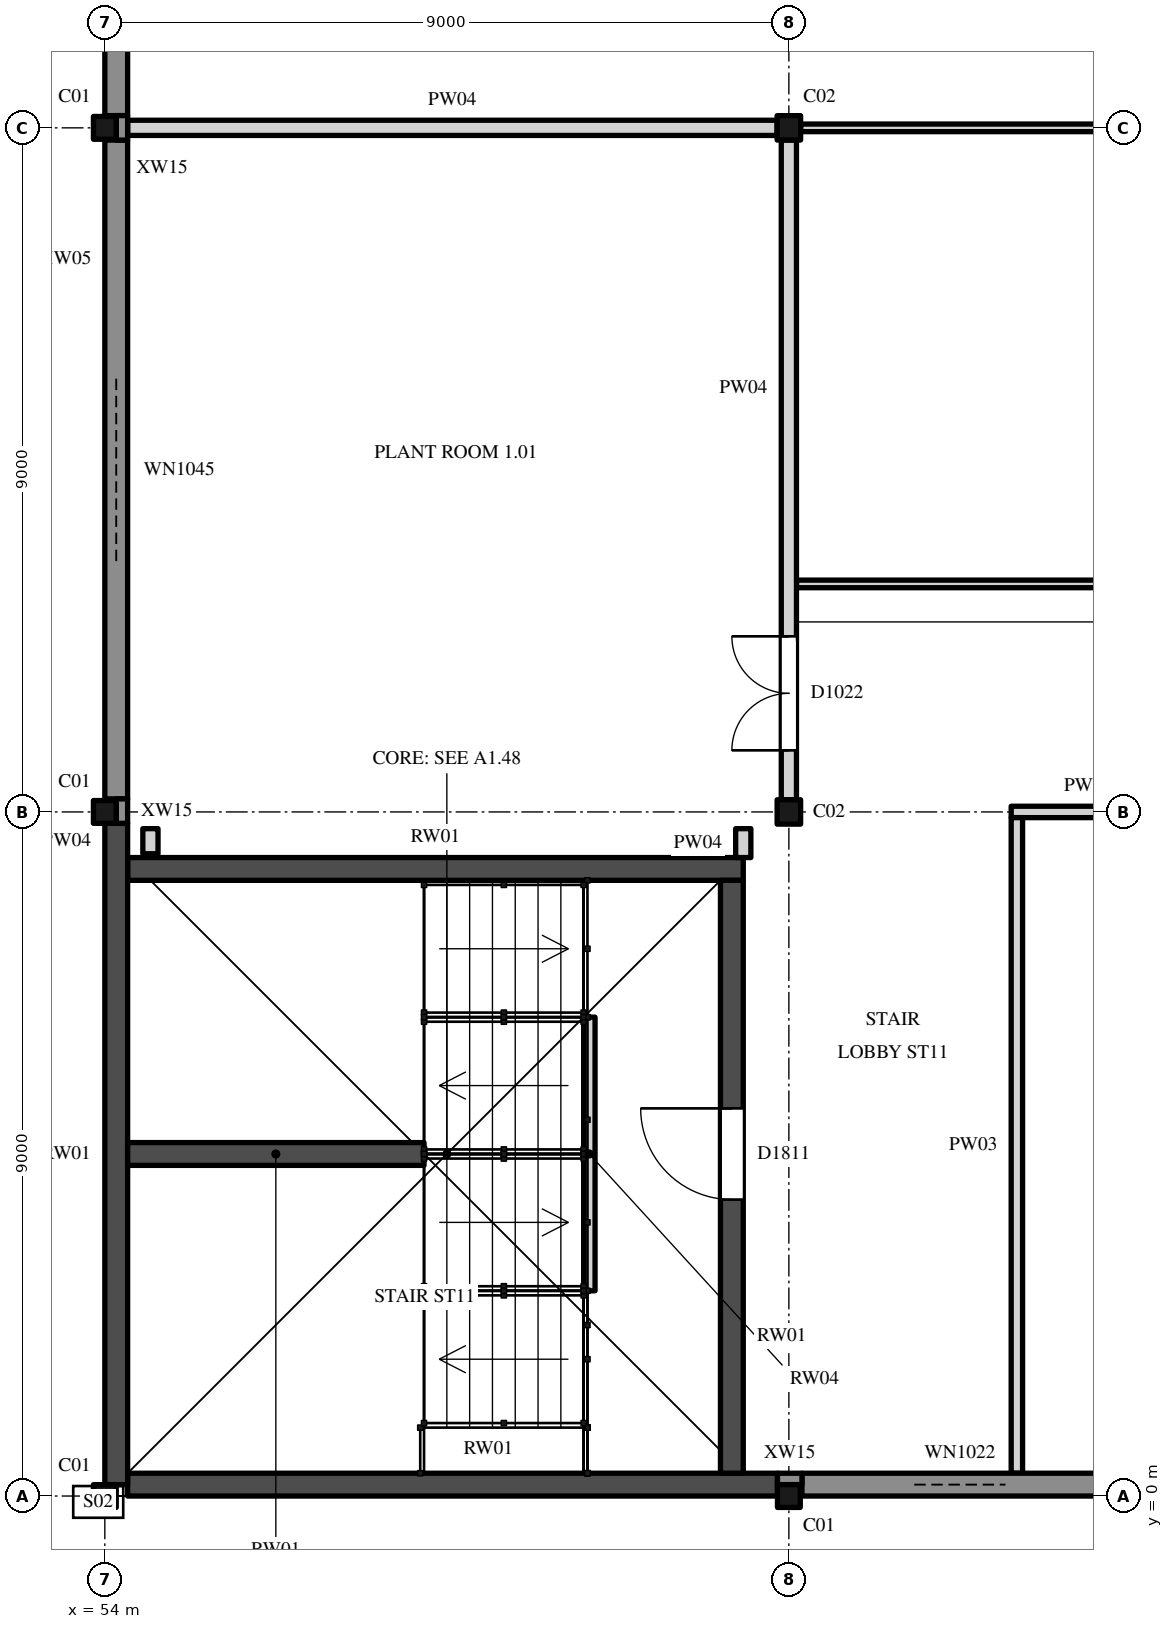
"""IFC4 building model, lengths in metres.
Left out: names, types, materials, properties, quantities, classifications, styles, units other than length and angle.
Written with IfcOpenShell. Run it as: python <this file> out.ifc"""

import sys

from ifc_helpers import new_model, si_unit, direction, frame, frame_2d, origin, origin_2d, place, context, subcontext, project, spatial, rectangle, hollow_rectangle, i_section, extrude, element, fill, save


model = new_model("IFC4")
c1 = context("Model", 3, precision=1e-05, world=origin(), true_north=direction((0.0, 1.0)))
c2 = subcontext(c1, "Body", "Model", "MODEL_VIEW")
j1 = project(units=[si_unit("LENGTHUNIT", "METRE"), si_unit("PLANEANGLEUNIT", "RADIAN")], contexts=[c1])
p1 = place(None, origin())
s1 = spatial("IfcSite", under=j1, at=p1, CompositionType="ELEMENT")
p2 = place(p1, origin())
s2 = spatial("IfcBuilding", under=s1, at=p2, CompositionType="ELEMENT")
p3 = place(p2, frame((0.0, 0.0, 6.0)))
s3 = spatial("IfcBuildingStorey", under=s2, at=p3, CompositionType="ELEMENT", Elevation=6.0)
for number, where, z_axis, x_axis in (
    (1, (54.0, 0.0, 0.0), (0.0, 0.0, 1.0), (1.0, 0.0, 0.0)),
    (2, (63.0, 0.0, 0.0), (0.0, 0.0, 1.0), (1.0, 0.0, 0.0)),
    (3, (54.0, 9.0, 0.0), (0.0, 0.0, 1.0), (1.0, 0.0, 0.0)),
):
    element("IfcColumn", number, at=place(p3, frame(where, z_axis=z_axis, x_axis=x_axis)), inside=s3, PredefinedType="COLUMN", context=c2, shape_type="SweptSolid", body=[
        extrude(hollow_rectangle(XDim=0.3, YDim=0.3, WallThickness=0.012, InnerFilletRadius=0.019, OuterFilletRadius=0.031, at=origin_2d()), origin(), (0.0, 0.0, 1.0), 5.0),
    ])
p4 = place(p3, frame((63.0, 9.0, 0.0), z_axis=(0.0, 0.0, 1.0), x_axis=(1.0, 0.0, 0.0)))
e4 = element("IfcColumn", 4, at=p4, inside=s3, PredefinedType="COLUMN", context=c2, shape_type="SweptSolid", body=[
    extrude(i_section(OverallWidth=0.309, OverallDepth=0.321, WebThickness=0.014, FlangeThickness=0.022, FilletRadius=0.017, at=origin_2d()), origin(), (0.0, 0.0, 1.0), 5.0),
])
p5 = place(p3, frame((54.0, 18.0, 0.0), z_axis=(0.0, 0.0, 1.0), x_axis=(1.0, 0.0, 0.0)))
e5 = element("IfcColumn", 5, at=p5, inside=s3, PredefinedType="COLUMN", context=c2, shape_type="SweptSolid", body=[
    extrude(hollow_rectangle(XDim=0.3, YDim=0.3, WallThickness=0.012, InnerFilletRadius=0.019, OuterFilletRadius=0.031, at=origin_2d()), origin(), (0.0, 0.0, 1.0), 5.0),
])
p6 = place(p3, frame((63.0, 18.0, 0.0), z_axis=(0.0, 0.0, 1.0), x_axis=(1.0, 0.0, 0.0)))
e6 = element("IfcColumn", 6, at=p6, inside=s3, PredefinedType="COLUMN", context=c2, shape_type="SweptSolid", body=[
    extrude(i_section(OverallWidth=0.309, OverallDepth=0.321, WebThickness=0.014, FlangeThickness=0.022, FilletRadius=0.017, at=origin_2d()), origin(), (0.0, 0.0, 1.0), 5.0),
])
p7 = place(p3, frame((54.3, 0.15, 0.0), z_axis=(0.0, 0.0, 1.0), x_axis=(1.0, 0.0, 0.0)))
e7 = element("IfcWall", 7, at=p7, inside=s3, PredefinedType="SHEAR", context=c2, shape_type="SweptSolid", body=[
    extrude(rectangle(XDim=8.55, YDim=0.3, at=frame_2d((4.275, 0.0))), origin(), (0.0, 0.0, 1.0), 5.0),
])
p8 = place(p3, frame((54.3, 8.25, 0.0), z_axis=(0.0, 0.0, 1.0), x_axis=(1.0, 0.0, 0.0)))
e8 = element("IfcWall", 8, at=p8, inside=s3, PredefinedType="SHEAR", context=c2, shape_type="SweptSolid", body=[
    extrude(rectangle(XDim=8.1, YDim=0.3, at=frame_2d((4.05, 0.0))), origin(), (0.0, 0.0, 1.0), 5.0),
])
p9 = place(p3, frame((54.15, 0.15, 0.0), z_axis=(0.0, 0.0, 1.0), x_axis=(0.0, 1.0, 0.0)))
e9 = element("IfcWall", 9, at=p9, inside=s3, PredefinedType="SHEAR", context=c2, shape_type="SweptSolid", body=[
    extrude(rectangle(XDim=8.7, YDim=0.3, at=frame_2d((4.35, 0.0))), origin(), (0.0, 0.0, 1.0), 5.0),
])
p10 = place(p3, frame((62.25, 0.3, 0.0), z_axis=(0.0, 0.0, 1.0), x_axis=(0.0, 1.0, 0.0)))
e10 = element("IfcWall", 10, at=p10, inside=s3, PredefinedType="SHEAR", context=c2, shape_type="SweptSolid", body=[
    extrude(rectangle(XDim=7.8, YDim=0.3, at=frame_2d((3.9, 0.0))), origin(), (0.0, 0.0, 1.0), 5.0),
])
p11 = place(p10, frame((3.6, 0.0, 0.0)))
e11 = element("IfcOpeningElement", 11, at=p11, cuts=e10, PredefinedType="OPENING", context=c2, shape_type="SweptSolid", body=[
    extrude(rectangle(XDim=1.2, YDim=2.1, at=frame_2d((0.6, 1.05))), frame((0.0, 0.16, 0.0), z_axis=(0.0, -1.0, 0.0), x_axis=(1.0, 0.0, 0.0)), (0.0, 0.0, 1.0), 0.32),
])
p12 = place(p3, frame((58.2, 4.5, 0.0), z_axis=(0.0, 0.0, 1.0), x_axis=(-1.0, 0.0, 0.0)))
e12 = element("IfcWall", 12, at=p12, inside=s3, PredefinedType="SHEAR", context=c2, shape_type="SweptSolid", body=[
    extrude(rectangle(XDim=3.9, YDim=0.3, at=frame_2d((1.95, 0.0))), origin(), (0.0, 0.0, 1.0), 5.0),
])
p13 = place(p3, frame((60.375, 2.7, 0.0), z_axis=(0.0, 0.0, 1.0), x_axis=(0.0, 1.0, 0.0)))
e13 = element("IfcWall", 13, at=p13, inside=s3, PredefinedType="STANDARD", context=c2, shape_type="SweptSolid", body=[
    extrude(rectangle(XDim=3.6, YDim=0.15, at=frame_2d((1.8, 0.0))), origin(), (0.0, 0.0, 1.0), 2.3),
])
p14 = place(p3, frame((63.172, 0.15, 0.0), z_axis=(0.0, 0.0, 1.0), x_axis=(1.0, 0.0, 0.0)))
e14 = element("IfcWall", 14, at=p14, inside=s3, PredefinedType="SOLIDWALL", context=c2, shape_type="SweptSolid", body=[
    extrude(rectangle(XDim=8.667, YDim=0.3, at=frame_2d((4.333, 0.0))), origin(), (0.0, 0.0, 1.0), 4.419),
])
p15 = place(p14, frame((1.478, 0.0, 1.2)))
e15 = element("IfcOpeningElement", 15, at=p15, cuts=e14, PredefinedType="OPENING", context=c2, shape_type="SweptSolid", body=[
    extrude(rectangle(XDim=1.2, YDim=1.5, at=frame_2d((0.6, 0.75))), frame((0.0, 0.16, 0.0), z_axis=(0.0, -1.0, 0.0), x_axis=(1.0, 0.0, 0.0)), (0.0, 0.0, 1.0), 0.32),
])
p16 = place(p14, frame((5.978, 0.0, 1.2)))
e16 = element("IfcOpeningElement", 16, at=p16, cuts=e14, PredefinedType="OPENING", context=c2, shape_type="SweptSolid", body=[
    extrude(rectangle(XDim=1.2, YDim=1.5, at=frame_2d((0.6, 0.75))), frame((0.0, 0.16, 0.0), z_axis=(0.0, -1.0, 0.0), x_axis=(1.0, 0.0, 0.0)), (0.0, 0.0, 1.0), 0.32),
])
p17 = place(p3, frame((54.15, 9.172, 0.0), z_axis=(0.0, 0.0, 1.0), x_axis=(0.0, 1.0, 0.0)))
e17 = element("IfcWall", 17, at=p17, inside=s3, PredefinedType="SOLIDWALL", context=c2, shape_type="SweptSolid", body=[
    extrude(rectangle(XDim=8.667, YDim=0.3, at=frame_2d((4.333, 0.0))), origin(), (0.0, 0.0, 1.0), 4.297),
])
p18 = place(p17, frame((3.128, 0.0, 0.9)))
e18 = element("IfcOpeningElement", 18, at=p18, cuts=e17, PredefinedType="OPENING", context=c2, shape_type="SweptSolid", body=[
    extrude(rectangle(XDim=2.4, YDim=1.8, at=frame_2d((1.2, 0.9))), frame((0.0, 0.16, 0.0), z_axis=(0.0, -1.0, 0.0), x_axis=(1.0, 0.0, 0.0)), (0.0, 0.0, 1.0), 0.32),
])
p19 = place(p3, frame((54.15, 18.161, 0.0), z_axis=(0.0, 0.0, 1.0), x_axis=(0.0, 1.0, 0.0)))
e19 = element("IfcWall", 19, at=p19, inside=s3, PredefinedType="SOLIDWALL", context=c2, shape_type="SweptSolid", body=[
    extrude(rectangle(XDim=8.667, YDim=0.3, at=frame_2d((4.333, 0.0))), origin(), (0.0, 0.0, 1.0), 4.297),
])
p20 = place(p19, frame((1.489, 0.0, 1.2)))
e20 = element("IfcOpeningElement", 20, at=p20, cuts=e19, PredefinedType="OPENING", context=c2, shape_type="SweptSolid", body=[
    extrude(rectangle(XDim=1.2, YDim=1.5, at=frame_2d((0.6, 0.75))), frame((0.0, 0.16, 0.0), z_axis=(0.0, -1.0, 0.0), x_axis=(1.0, 0.0, 0.0)), (0.0, 0.0, 1.0), 0.32),
])
p21 = place(p19, frame((5.989, 0.0, 1.2)))
e21 = element("IfcOpeningElement", 21, at=p21, cuts=e19, PredefinedType="OPENING", context=c2, shape_type="SweptSolid", body=[
    extrude(rectangle(XDim=1.2, YDim=1.5, at=frame_2d((0.6, 0.75))), frame((0.0, 0.16, 0.0), z_axis=(0.0, -1.0, 0.0), x_axis=(1.0, 0.0, 0.0)), (0.0, 0.0, 1.0), 0.32),
])
for number, where, z_axis, x_axis in (
    (22, (62.85, 0.225, 0.0), (0.0, 0.0, 1.0), (1.0, 0.0, 0.0)),
    (23, (54.225, 8.85, 0.0), (0.0, 0.0, 1.0), (0.0, 1.0, 0.0)),
):
    element("IfcWall", number, at=place(p3, frame(where, z_axis=z_axis, x_axis=x_axis)), inside=s3, PredefinedType="SOLIDWALL", context=c2, shape_type="SweptSolid", body=[
        extrude(rectangle(XDim=0.322, YDim=0.15, at=frame_2d((0.161, 0.0))), origin(), (0.0, 0.0, 1.0), 5.0),
    ])
p22 = place(p3, frame((54.225, 17.839, 0.0), z_axis=(0.0, 0.0, 1.0), x_axis=(0.0, 1.0, 0.0)))
e24 = element("IfcWall", 24, at=p22, inside=s3, PredefinedType="SOLIDWALL", context=c2, shape_type="SweptSolid", body=[
    extrude(rectangle(XDim=0.322, YDim=0.15, at=frame_2d((0.161, 0.0))), origin(), (0.0, 0.0, 1.0), 4.297),
])
p23 = place(p3, frame((65.925, 9.0, 0.0), z_axis=(0.0, 0.0, 1.0), x_axis=(1.0, 0.0, 0.0)))
e25 = element("IfcWall", 25, at=p23, inside=s3, PredefinedType="PARTITIONING", context=c2, shape_type="SweptSolid", body=[
    extrude(rectangle(XDim=5.92, YDim=0.15, at=frame_2d((2.96, 0.0))), origin(), (0.0, 0.0, 1.0), 4.419),
])
p24 = place(p23, frame((2.025, 0.0, 0.0)))
e26 = element("IfcOpeningElement", 26, at=p24, cuts=e25, PredefinedType="OPENING", context=c2, shape_type="SweptSolid", body=[
    extrude(rectangle(XDim=2.0, YDim=2.4, at=frame_2d((1.0, 1.2))), frame((0.0, 0.085, 0.0), z_axis=(0.0, -1.0, 0.0), x_axis=(1.0, 0.0, 0.0)), (0.0, 0.0, 1.0), 0.17),
])
p25 = place(p3, frame((63.1, 12.0, 0.0), z_axis=(0.0, 0.0, 1.0), x_axis=(1.0, 0.0, 0.0)))
e27 = element("IfcWall", 27, at=p25, inside=s3, PredefinedType="PARTITIONING", context=c2, shape_type="SweptSolid", body=[
    extrude(rectangle(XDim=35.95, YDim=0.1, at=frame_2d((17.975, 0.0))), origin(), (0.0, 0.0, 1.0), 4.419),
])
p26 = place(p25, frame((8.25, 0.0, 0.0)))
e28 = element("IfcOpeningElement", 28, at=p26, cuts=e27, PredefinedType="OPENING", context=c2, shape_type="SweptSolid", body=[
    extrude(rectangle(XDim=1.35, YDim=2.4, at=frame_2d((0.675, 1.2))), frame((0.0, 0.06, 0.0), z_axis=(0.0, -1.0, 0.0), x_axis=(1.0, 0.0, 0.0)), (0.0, 0.0, 1.0), 0.12),
])
p27 = place(p25, frame((26.25, 0.0, 0.0)))
e29 = element("IfcOpeningElement", 29, at=p27, cuts=e27, PredefinedType="OPENING", context=c2, shape_type="SweptSolid", body=[
    extrude(rectangle(XDim=1.35, YDim=2.4, at=frame_2d((0.675, 1.2))), frame((0.0, 0.06, 0.0), z_axis=(0.0, -1.0, 0.0), x_axis=(1.0, 0.0, 0.0)), (0.0, 0.0, 1.0), 0.12),
])
p28 = place(p3, frame((54.3, 18.0, 0.0), z_axis=(0.0, 0.0, 1.0), x_axis=(1.0, 0.0, 0.0)))
e30 = element("IfcWall", 30, at=p28, inside=s3, PredefinedType="PARTITIONING", context=c2, shape_type="SweptSolid", body=[
    extrude(rectangle(XDim=8.545, YDim=0.2, at=frame_2d((4.273, 0.0))), origin(), (0.0, 0.0, 1.0), 4.419),
])
p29 = place(p3, frame((63.155, 18.0, 0.0), z_axis=(0.0, 0.0, 1.0), x_axis=(1.0, 0.0, 0.0)))
e31 = element("IfcWall", 31, at=p29, inside=s3, PredefinedType="PARTITIONING", context=c2, shape_type="SweptSolid", body=[
    extrude(rectangle(XDim=8.691, YDim=0.1, at=frame_2d((4.345, 0.0))), origin(), (0.0, 0.0, 1.0), 4.419),
])
p30 = place(p3, frame((54.6, 8.45, 0.0), z_axis=(0.0, 0.0, 1.0), x_axis=(0.0, 1.0, 0.0)))
e32 = element("IfcWall", 32, at=p30, inside=s3, PredefinedType="PARTITIONING", context=c2, shape_type="SweptSolid", body=[
    extrude(rectangle(XDim=0.33, YDim=0.2, at=frame_2d((0.165, 0.0))), origin(), (0.0, 0.0, 1.0), 4.825),
])
p31 = place(p3, frame((62.4, 8.4, 0.0), z_axis=(0.0, 0.0, 1.0), x_axis=(0.0, 1.0, 0.0)))
e33 = element("IfcWall", 33, at=p31, inside=s3, PredefinedType="PARTITIONING", context=c2, shape_type="SweptSolid", body=[
    extrude(rectangle(XDim=0.38, YDim=0.2, at=frame_2d((0.19, 0.0))), origin(), (0.0, 0.0, 1.0), 4.825),
])
p32 = place(p3, frame((63.0, 9.16, 0.0), z_axis=(0.0, 0.0, 1.0), x_axis=(0.0, 1.0, 0.0)))
e34 = element("IfcWall", 34, at=p32, inside=s3, PredefinedType="PARTITIONING", context=c2, shape_type="SweptSolid", body=[
    extrude(rectangle(XDim=8.679, YDim=0.2, at=frame_2d((4.34, 0.0))), origin(), (0.0, 0.0, 1.0), 4.297),
])
p33 = place(p32, frame((0.65, 0.0, 0.0)))
e35 = element("IfcOpeningElement", 35, at=p33, cuts=e34, PredefinedType="OPENING", context=c2, shape_type="SweptSolid", body=[
    extrude(rectangle(XDim=1.5, YDim=2.4, at=frame_2d((0.75, 1.2))), frame((0.0, 0.11, 0.0), z_axis=(0.0, -1.0, 0.0), x_axis=(1.0, 0.0, 0.0)), (0.0, 0.0, 1.0), 0.22),
])
p34 = place(p3, frame((66.0, 0.3, 0.0), z_axis=(0.0, 0.0, 1.0), x_axis=(0.0, 1.0, 0.0)))
e36 = element("IfcWall", 36, at=p34, inside=s3, PredefinedType="PARTITIONING", context=c2, shape_type="SweptSolid", body=[
    extrude(rectangle(XDim=8.625, YDim=0.15, at=frame_2d((4.312, 0.0))), origin(), (0.0, 0.0, 1.0), 4.825),
])
p35 = place(p11, origin())
e37 = element("IfcDoor", 37, at=p35, inside=s3, OperationType="SINGLE_SWING_LEFT", PredefinedType="DOOR", context=c2, shape_type="SweptSolid", body=[
    extrude(rectangle(XDim=1.2, YDim=2.1, at=frame_2d((0.6, 1.05))), frame((0.0, 0.025, 0.0), z_axis=(0.0, -1.0, 0.0), x_axis=(1.0, 0.0, 0.0)), (0.0, 0.0, 1.0), 0.05),
])
fill(e11, e37)
p36 = place(p15, origin())
e38 = element("IfcWindow", 38, at=p36, inside=s3, PartitioningType="SINGLE_PANEL", PredefinedType="WINDOW", context=c2, shape_type="SweptSolid", body=[
    extrude(rectangle(XDim=1.2, YDim=1.5, at=frame_2d((0.6, 0.75))), frame((0.0, 0.03, 0.0), z_axis=(0.0, -1.0, 0.0), x_axis=(1.0, 0.0, 0.0)), (0.0, 0.0, 1.0), 0.06),
])
fill(e15, e38)
p37 = place(p18, origin())
e39 = element("IfcWindow", 39, at=p37, inside=s3, PartitioningType="TRIPLE_PANEL_VERTICAL", PredefinedType="WINDOW", context=c2, shape_type="SweptSolid", body=[
    extrude(rectangle(XDim=2.4, YDim=1.8, at=frame_2d((1.2, 0.9))), frame((0.0, 0.03, 0.0), z_axis=(0.0, -1.0, 0.0), x_axis=(1.0, 0.0, 0.0)), (0.0, 0.0, 1.0), 0.06),
])
fill(e18, e39)
p38 = place(p33, origin())
e40 = element("IfcDoor", 40, at=p38, inside=s3, OperationType="DOUBLE_DOOR_SINGLE_SWING", PredefinedType="DOOR", context=c2, shape_type="SweptSolid", body=[
    extrude(rectangle(XDim=1.5, YDim=2.4, at=frame_2d((0.75, 1.2))), frame((0.0, 0.025, 0.0), z_axis=(0.0, -1.0, 0.0), x_axis=(1.0, 0.0, 0.0)), (0.0, 0.0, 1.0), 0.05),
])
fill(e35, e40)
save(model, sys.argv[1])
